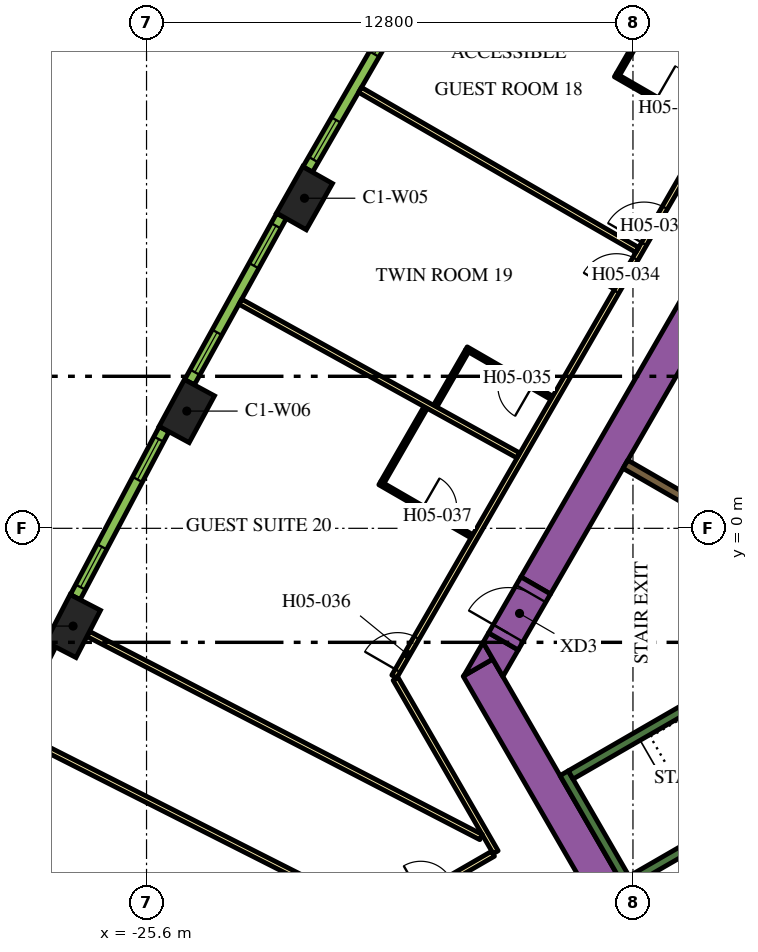
"""IFC4 building model, lengths in metres.
Left out: names, types, materials, properties, quantities, classifications, styles, units other than length and angle.
Written with IfcOpenShell. Run it as: python <this file> out.ifc"""

import sys

from ifc_helpers import new_model, si_unit, direction, frame, frame_2d, origin, origin_2d, place, context, subcontext, project, spatial, polyline, rectangle, outline, extrude, element, fill, save


model = new_model("IFC4")
c1 = context("Model", 3, precision=1e-05, world=origin(), true_north=direction((0.0, 1.0)))
c2 = subcontext(c1, "Body", "Model", "MODEL_VIEW")
j1 = project(units=[si_unit("LENGTHUNIT", "METRE"), si_unit("PLANEANGLEUNIT", "RADIAN")], contexts=[c1])
p1 = place(None, origin())
s1 = spatial("IfcSite", under=j1, at=p1, CompositionType="ELEMENT")
p2 = place(p1, origin())
s2 = spatial("IfcBuilding", under=s1, at=p2, CompositionType="ELEMENT")
p3 = place(p2, frame((0.0, 0.0, 74.4)))
s3 = spatial("IfcBuildingStorey", under=s2, at=p3, CompositionType="ELEMENT", Elevation=74.4)
for number, where, z_axis, x_axis in (
    (1, (-21.443, 8.685, 0.0), (0.0, 0.0, 1.0), (-0.492, -0.871, 0.0)),
    (2, (-24.54, 3.085, 0.0), (0.0, 0.0, 1.0), (-0.476, -0.88, 0.0)),
    (3, (-27.533, -2.572, 0.0), (0.0, 0.0, 1.0), (-0.459, -0.888, 0.0)),
):
    element("IfcColumn", number, at=place(p3, frame(where, z_axis=z_axis, x_axis=x_axis)), inside=s3, PredefinedType="COLUMN", context=c2, shape_type="SweptSolid", body=[
        extrude(rectangle(XDim=1.4, YDim=0.9, at=origin_2d()), origin(), (0.0, 0.0, 1.0), 3.9),
    ])
p4 = place(p3, frame((-15.36, -1.503, 0.0), z_axis=(0.0, 0.0, 1.0), x_axis=(0.50000389221, 0.866023156604, 0.0)))
e4 = element("IfcWall", 4, at=p4, inside=s3, PredefinedType="SOLIDWALL", context=c2, shape_type="SweptSolid", body=[
    extrude(rectangle(XDim=21.0, YDim=0.9, at=frame_2d((10.5, 0.0))), origin(), (0.0, 0.0, 1.0), 3.9),
])
p5 = place(p3, frame((-12.134, -11.883, 0.0), z_axis=(0.0, 0.0, 1.0), x_axis=(-0.500005339912, 0.866022320763, 0.0)))
e5 = element("IfcWall", 5, at=p5, inside=s3, PredefinedType="SOLIDWALL", context=c2, shape_type="SweptSolid", body=[
    extrude(rectangle(XDim=9.488, YDim=0.9, at=frame_2d((4.744, 0.0))), origin(), (0.0, 0.0, 1.0), 3.9),
])
p6 = place(p3, origin())
e6 = element("IfcWall", 6, at=p6, inside=s3, PredefinedType="SOLIDWALL", context=c2, shape_type="SweptSolid", body=[
    extrude(outline(polyline([(-16.489, -3.44), (-17.251, -3.88), (-16.743, -3.0), (-16.489, -3.44)])), origin(), (0.0, 0.0, 1.0), 3.9),
])
e7 = element("IfcWall", 7, at=p6, inside=s3, PredefinedType="SOLIDWALL", context=c2, shape_type="SweptSolid", body=[
    extrude(outline(polyline([(-15.82, -3.201), (-16.223, -3.9), (-16.743, -3.0), (-16.599, -2.751), (-15.82, -3.201)])), origin(), (0.0, 0.0, 1.0), 3.9),
])
p7 = place(p3, frame((-12.885, -9.431, 0.0), z_axis=(0.0, 0.0, 1.0), x_axis=(-0.500020560727, 0.866013532718, 0.0)))
e8 = element("IfcWall", 8, at=p7, inside=s3, PredefinedType="SOLIDWALL", context=c2, shape_type="SweptSolid", body=[
    extrude(rectangle(XDim=3.45, YDim=0.25, at=frame_2d((1.725, 0.0))), origin(), (0.0, 0.0, 1.0), 3.9),
])
p8 = place(p3, frame((-14.44, -6.49, 0.0), z_axis=(0.0, 0.0, 1.0), x_axis=(0.866022966069, 0.500004222222, 0.0)))
e9 = element("IfcWall", 9, at=p8, inside=s3, PredefinedType="SOLIDWALL", context=c2, shape_type="SweptSolid", body=[
    extrude(rectangle(XDim=6.8, YDim=0.25, at=frame_2d((3.4, 0.0))), origin(), (0.0, 0.0, 1.0), 3.9),
])
p9 = place(p3, frame((-12.84, -9.261, 0.0), z_axis=(0.0, 0.0, 1.0), x_axis=(0.866016039709, 0.500016218704, 0.0)))
e10 = element("IfcWall", 10, at=p9, inside=s3, PredefinedType="SOLIDWALL", context=c2, shape_type="SweptSolid", body=[
    extrude(rectangle(XDim=7.05, YDim=0.25, at=frame_2d((3.525, 0.0))), origin(), (0.0, 0.0, 1.0), 3.9),
])
p10 = place(p3, frame((-8.106, -1.14, 0.0), z_axis=(0.0, 0.0, 1.0), x_axis=(-0.866000643155, 0.500042884217, 0.0)))
e11 = element("IfcWall", 11, at=p10, inside=s3, PredefinedType="SOLIDWALL", context=c2, shape_type="SweptSolid", body=[
    extrude(rectangle(XDim=5.65, YDim=0.25, at=frame_2d((2.825, 0.0))), origin(), (0.0, 0.0, 1.0), 3.9),
])
p11 = place(p3, frame((-16.209, -2.976, 0.0), z_axis=(0.0, 0.0, 1.0), x_axis=(0.499954529098, 0.86605165483, 0.0)))
e12 = element("IfcWall", 12, at=p11, inside=s3, PredefinedType="SOLIDWALL", context=c2, shape_type="SweptSolid", body=[
    extrude(rectangle(XDim=1.7, YDim=0.9, at=frame_2d((0.85, 0.0))), origin(), (0.0, 0.0, 1.0), 3.9),
])
p12 = place(p11, frame((0.25, 0.0, 0.0)))
e13 = element("IfcOpeningElement", 13, at=p12, cuts=e12, PredefinedType="OPENING", context=c2, shape_type="SweptSolid", body=[
    extrude(rectangle(XDim=1.2, YDim=2.1, at=frame_2d((0.6, 1.05))), frame((0.0, 0.46, 0.0), z_axis=(0.0, -1.0, 0.0), x_axis=(1.0, 0.0, 0.0)), (0.0, 0.0, 1.0), 0.92),
])
p13 = place(p3, frame((-19.081, -3.9, 0.0), z_axis=(0.0, 0.0, 1.0), x_axis=(0.499998313975, 0.866026377209, 0.0)))
e14 = element("IfcWall", 14, at=p13, inside=s3, PredefinedType="PARTITIONING", context=c2, shape_type="SweptSolid", body=[
    extrude(rectangle(XDim=25.766, YDim=0.15, at=frame_2d((12.883, 0.0))), origin(), (0.0, 0.0, 1.0), 2.7),
])
p14 = place(p13, frame((24.265, 0.0, 0.0)))
e15 = element("IfcOpeningElement", 15, at=p14, cuts=e14, PredefinedType="OPENING", context=c2, shape_type="SweptSolid", body=[
    extrude(rectangle(XDim=1.0, YDim=2.1, at=frame_2d((0.5, 1.05))), frame((0.0, 0.085, 0.0), z_axis=(0.0, -1.0, 0.0), x_axis=(1.0, 0.0, 0.0)), (0.0, 0.0, 1.0), 0.17),
])
p15 = place(p13, frame((13.146, 0.0, 0.0)))
e16 = element("IfcOpeningElement", 16, at=p15, cuts=e14, PredefinedType="OPENING", context=c2, shape_type="SweptSolid", body=[
    extrude(rectangle(XDim=1.1, YDim=2.1, at=frame_2d((0.55, 1.05))), frame((0.0, 0.085, 0.0), z_axis=(0.0, -1.0, 0.0), x_axis=(1.0, 0.0, 0.0)), (0.0, 0.0, 1.0), 0.17),
])
p16 = place(p13, frame((11.693, 0.0, 0.0)))
e17 = element("IfcOpeningElement", 17, at=p16, cuts=e14, PredefinedType="OPENING", context=c2, shape_type="SweptSolid", body=[
    extrude(rectangle(XDim=1.0, YDim=2.1, at=frame_2d((0.5, 1.05))), frame((0.0, 0.085, 0.0), z_axis=(0.0, -1.0, 0.0), x_axis=(1.0, 0.0, 0.0)), (0.0, 0.0, 1.0), 0.17),
])
p17 = place(p13, frame((0.18, 0.0, 0.0)))
e18 = element("IfcOpeningElement", 18, at=p17, cuts=e14, PredefinedType="OPENING", context=c2, shape_type="SweptSolid", body=[
    extrude(rectangle(XDim=1.0, YDim=2.1, at=frame_2d((0.5, 1.05))), frame((0.0, 0.085, 0.0), z_axis=(0.0, -1.0, 0.0), x_axis=(1.0, 0.0, 0.0)), (0.0, 0.0, 1.0), 0.17),
])
p18 = place(p3, frame((-16.412, -8.523, 0.0), z_axis=(0.0, 0.0, 1.0), x_axis=(-0.500001929737, 0.866024289647, 0.0)))
e19 = element("IfcWall", 19, at=p18, inside=s3, PredefinedType="PARTITIONING", context=c2, shape_type="SweptSolid", body=[
    extrude(rectangle(XDim=5.268, YDim=0.15, at=frame_2d((2.634, 0.0))), origin(), (0.0, 0.0, 1.0), 2.7),
])
p19 = place(p3, frame((-30.463, -16.635, 0.0), z_axis=(0.0, 0.0, 1.0), x_axis=(0.866022394896, 0.500005211512, 0.0)))
e20 = element("IfcWall", 20, at=p19, inside=s3, PredefinedType="PARTITIONING", context=c2, shape_type="SweptSolid", body=[
    extrude(rectangle(XDim=16.144, YDim=0.15, at=frame_2d((8.072, 0.0))), origin(), (0.0, 0.0, 1.0), 2.7),
])
p20 = place(p19, frame((13.948, 0.0, 0.0)))
e21 = element("IfcOpeningElement", 21, at=p20, cuts=e20, PredefinedType="OPENING", context=c2, shape_type="SweptSolid", body=[
    extrude(rectangle(XDim=0.9, YDim=2.1, at=frame_2d((0.45, 1.05))), frame((0.0, 0.085, 0.0), z_axis=(0.0, -1.0, 0.0), x_axis=(1.0, 0.0, 0.0)), (0.0, 0.0, 1.0), 0.17),
])
p21 = place(p19, frame((10.329, 0.0, 0.0)))
e22 = element("IfcOpeningElement", 22, at=p21, cuts=e20, PredefinedType="OPENING", context=c2, shape_type="SweptSolid", body=[
    extrude(rectangle(XDim=0.9, YDim=2.1, at=frame_2d((0.45, 1.05))), frame((0.0, 0.085, 0.0), z_axis=(0.0, -1.0, 0.0), x_axis=(1.0, 0.0, 0.0)), (0.0, 0.0, 1.0), 0.17),
])
p22 = place(p19, frame((7.275, 0.0, 0.0)))
e23 = element("IfcOpeningElement", 23, at=p22, cuts=e20, PredefinedType="OPENING", context=c2, shape_type="SweptSolid", body=[
    extrude(rectangle(XDim=1.0, YDim=2.1, at=frame_2d((0.5, 1.05))), frame((0.0, 0.085, 0.0), z_axis=(0.0, -1.0, 0.0), x_axis=(1.0, 0.0, 0.0)), (0.0, 0.0, 1.0), 0.17),
])
p23 = place(p3, frame((-30.018, -8.483, 0.0), z_axis=(0.0, 0.0, 1.0), x_axis=(0.896544505264, -0.44295366584, 0.0)))
e24 = element("IfcWall", 24, at=p23, inside=s3, PredefinedType="PARTITIONING", context=c2, shape_type="SweptSolid", body=[
    extrude(rectangle(XDim=8.079, YDim=0.15, at=frame_2d((4.04, 0.0))), origin(), (0.0, 0.0, 1.0), 2.7),
])
p24 = place(p3, frame((-29.12, -5.356, 0.0), z_axis=(0.0, 0.0, 1.0), x_axis=(0.892401965553, -0.451241323327, 0.0)))
e25 = element("IfcWall", 25, at=p24, inside=s3, PredefinedType="PARTITIONING", context=c2, shape_type="SweptSolid", body=[
    extrude(rectangle(XDim=10.729, YDim=0.15, at=frame_2d((5.364, 0.0))), origin(), (0.0, 0.0, 1.0), 2.7),
])
p25 = place(p3, frame((-27.134, -2.779, 0.0), z_axis=(0.0, 0.0, 1.0), x_axis=(0.8882049501, -0.459447457951, 0.0)))
e26 = element("IfcWall", 26, at=p25, inside=s3, PredefinedType="PARTITIONING", context=c2, shape_type="SweptSolid", body=[
    extrude(rectangle(XDim=11.638, YDim=0.15, at=frame_2d((5.819, 0.0))), origin(), (0.0, 0.0, 1.0), 2.7),
])
p26 = place(p3, frame((-23.132, 5.962, 0.0), z_axis=(0.0, 0.0, 1.0), x_axis=(0.875121716713, -0.483902863121, 0.0)))
e27 = element("IfcWall", 27, at=p26, inside=s3, PredefinedType="PARTITIONING", context=c2, shape_type="SweptSolid", body=[
    extrude(rectangle(XDim=8.355, YDim=0.15, at=frame_2d((4.178, 0.0))), origin(), (0.0, 0.0, 1.0), 2.7),
])
p27 = place(p3, frame((-19.982, 11.537, 0.0), z_axis=(0.0, 0.0, 1.0), x_axis=(0.866020994654, -0.500007636761, 0.0)))
e28 = element("IfcWall", 28, at=p27, inside=s3, PredefinedType="PARTITIONING", context=c2, shape_type="SweptSolid", body=[
    extrude(rectangle(XDim=8.423, YDim=0.15, at=frame_2d((4.211, 0.0))), origin(), (0.0, 0.0, 1.0), 2.7),
])
p28 = place(p3, frame((-13.265, 11.924, 0.0), z_axis=(0.0, 0.0, 1.0), x_axis=(0.866034573852, -0.49998411664, 0.0)))
e29 = element("IfcWall", 29, at=p28, inside=s3, PredefinedType="PARTITIONING", context=c2, shape_type="SweptSolid", body=[
    extrude(rectangle(XDim=2.8, YDim=0.1, at=frame_2d((1.4, 0.0))), origin(), (0.0, 0.0, 1.0), 2.7),
])
p29 = place(p28, frame((1.25, 0.0, 0.0)))
e30 = element("IfcOpeningElement", 30, at=p29, cuts=e29, PredefinedType="OPENING", context=c2, shape_type="SweptSolid", body=[
    extrude(rectangle(XDim=1.0, YDim=2.1, at=frame_2d((0.5, 1.05))), frame((0.0, 0.06, 0.0), z_axis=(0.0, -1.0, 0.0), x_axis=(1.0, 0.0, 0.0)), (0.0, 0.0, 1.0), 0.12),
])
p30 = place(p3, frame((-13.197, 11.942, 0.0), z_axis=(0.0, 0.0, 1.0), x_axis=(0.499944914708, 0.866057204957, 0.0)))
e31 = element("IfcWall", 31, at=p30, inside=s3, PredefinedType="PARTITIONING", context=c2, shape_type="SweptSolid", body=[
    extrude(rectangle(XDim=2.47, YDim=0.1, at=frame_2d((1.235, 0.0))), origin(), (0.0, 0.0, 1.0), 2.7),
])
p31 = place(p3, frame((-14.935, 3.432, 0.0), z_axis=(0.0, 0.0, 1.0), x_axis=(-0.865997922154, 0.500047596559, 0.0)))
e32 = element("IfcWall", 32, at=p31, inside=s3, PredefinedType="PARTITIONING", context=c2, shape_type="SweptSolid", body=[
    extrude(rectangle(XDim=2.6, YDim=0.1, at=frame_2d((1.3, 0.0))), origin(), (0.0, 0.0, 1.0), 2.7),
])
p32 = place(p31, frame((0.6, 0.0, 0.0)))
e33 = element("IfcOpeningElement", 33, at=p32, cuts=e32, PredefinedType="OPENING", context=c2, shape_type="SweptSolid", body=[
    extrude(rectangle(XDim=0.9, YDim=2.1, at=frame_2d((0.45, 1.05))), frame((0.0, 0.06, 0.0), z_axis=(0.0, -1.0, 0.0), x_axis=(1.0, 0.0, 0.0)), (0.0, 0.0, 1.0), 0.12),
])
p33 = place(p3, frame((-17.168, 4.664, 0.0), z_axis=(0.0, 0.0, 1.0), x_axis=(-0.500085185139, -0.865976216535, 0.0)))
e34 = element("IfcWall", 34, at=p33, inside=s3, PredefinedType="PARTITIONING", context=c2, shape_type="SweptSolid", body=[
    extrude(rectangle(XDim=1.67, YDim=0.1, at=frame_2d((0.835, 0.0))), origin(), (0.0, 0.0, 1.0), 2.7),
])
p34 = place(p3, frame((-19.463, 1.19, 0.0), z_axis=(0.0, 0.0, 1.0), x_axis=(0.866034573852, -0.49998411664, 0.0)))
e35 = element("IfcWall", 35, at=p34, inside=s3, PredefinedType="PARTITIONING", context=c2, shape_type="SweptSolid", body=[
    extrude(rectangle(XDim=2.8, YDim=0.1, at=frame_2d((1.4, 0.0))), origin(), (0.0, 0.0, 1.0), 2.7),
])
p35 = place(p34, frame((1.3, 0.0, 0.0)))
e36 = element("IfcOpeningElement", 36, at=p35, cuts=e35, PredefinedType="OPENING", context=c2, shape_type="SweptSolid", body=[
    extrude(rectangle(XDim=0.9, YDim=2.1, at=frame_2d((0.45, 1.05))), frame((0.0, 0.06, 0.0), z_axis=(0.0, -1.0, 0.0), x_axis=(1.0, 0.0, 0.0)), (0.0, 0.0, 1.0), 0.12),
])
p36 = place(p3, frame((-19.389, 1.217, 0.0), z_axis=(0.0, 0.0, 1.0), x_axis=(0.49995000081, 0.866054268906, 0.0)))
e37 = element("IfcWall", 37, at=p36, inside=s3, PredefinedType="PARTITIONING", context=c2, shape_type="SweptSolid", body=[
    extrude(rectangle(XDim=2.26, YDim=0.1, at=frame_2d((1.13, 0.0))), origin(), (0.0, 0.0, 1.0), 2.7),
])
p37 = place(p3, frame((-18.858, 13.773, 0.0), z_axis=(0.0, 0.0, 1.0), x_axis=(-0.50002123722, -0.866013142123, 0.0)))
e38 = element("IfcWall", 38, at=p37, inside=s3, PredefinedType="SOLIDWALL", context=c2, shape_type="SweptSolid", body=[
    extrude(rectangle(XDim=4.998, YDim=0.29, at=frame_2d((2.499, 0.0))), origin(), (0.0, 0.0, 1.0), 3.6),
])
p38 = place(p37, frame((0.297, 0.0, 0.9)))
e39 = element("IfcOpeningElement", 39, at=p38, cuts=e38, PredefinedType="OPENING", context=c2, shape_type="SweptSolid", body=[
    extrude(rectangle(XDim=1.2, YDim=2.15, at=frame_2d((0.6, 1.075))), frame((0.0, 0.155, 0.0), z_axis=(0.0, -1.0, 0.0), x_axis=(1.0, 0.0, 0.0)), (0.0, 0.0, 1.0), 0.31),
])
p39 = place(p37, frame((3.501, 0.0, 0.9)))
e40 = element("IfcOpeningElement", 40, at=p39, cuts=e38, PredefinedType="OPENING", context=c2, shape_type="SweptSolid", body=[
    extrude(rectangle(XDim=1.2, YDim=2.15, at=frame_2d((0.6, 1.075))), frame((0.0, 0.155, 0.0), z_axis=(0.0, -1.0, 0.0), x_axis=(1.0, 0.0, 0.0)), (0.0, 0.0, 1.0), 0.31),
])
p40 = place(p3, frame((-22.05, 8.22, 0.0), z_axis=(0.0, 0.0, 1.0), x_axis=(-0.483912572871, -0.875116347589, 0.0)))
e41 = element("IfcWall", 41, at=p40, inside=s3, PredefinedType="SOLIDWALL", context=c2, shape_type="SweptSolid", body=[
    extrude(rectangle(XDim=4.998, YDim=0.29, at=frame_2d((2.499, 0.0))), origin(), (0.0, 0.0, 1.0), 3.6),
])
p41 = place(p40, frame((0.297, 0.0, 0.9)))
e42 = element("IfcOpeningElement", 42, at=p41, cuts=e41, PredefinedType="OPENING", context=c2, shape_type="SweptSolid", body=[
    extrude(rectangle(XDim=1.2, YDim=2.15, at=frame_2d((0.6, 1.075))), frame((0.0, 0.155, 0.0), z_axis=(0.0, -1.0, 0.0), x_axis=(1.0, 0.0, 0.0)), (0.0, 0.0, 1.0), 0.31),
])
p42 = place(p40, frame((3.501, 0.0, 0.9)))
e43 = element("IfcOpeningElement", 43, at=p42, cuts=e41, PredefinedType="OPENING", context=c2, shape_type="SweptSolid", body=[
    extrude(rectangle(XDim=1.2, YDim=2.15, at=frame_2d((0.6, 1.075))), frame((0.0, 0.155, 0.0), z_axis=(0.0, -1.0, 0.0), x_axis=(1.0, 0.0, 0.0)), (0.0, 0.0, 1.0), 0.31),
])
p43 = place(p3, frame((-25.138, 2.608, 0.0), z_axis=(0.0, 0.0, 1.0), x_axis=(-0.467629620899, -0.883924509026, 0.0)))
e44 = element("IfcWall", 44, at=p43, inside=s3, PredefinedType="SOLIDWALL", context=c2, shape_type="SweptSolid", body=[
    extrude(rectangle(XDim=4.998, YDim=0.29, at=frame_2d((2.499, 0.0))), origin(), (0.0, 0.0, 1.0), 3.6),
])
p44 = place(p43, frame((0.297, 0.0, 0.9)))
e45 = element("IfcOpeningElement", 45, at=p44, cuts=e44, PredefinedType="OPENING", context=c2, shape_type="SweptSolid", body=[
    extrude(rectangle(XDim=1.2, YDim=2.15, at=frame_2d((0.6, 1.075))), frame((0.0, 0.155, 0.0), z_axis=(0.0, -1.0, 0.0), x_axis=(1.0, 0.0, 0.0)), (0.0, 0.0, 1.0), 0.31),
])
p45 = place(p43, frame((3.501, 0.0, 0.9)))
e46 = element("IfcOpeningElement", 46, at=p45, cuts=e44, PredefinedType="OPENING", context=c2, shape_type="SweptSolid", body=[
    extrude(rectangle(XDim=1.2, YDim=2.15, at=frame_2d((0.6, 1.075))), frame((0.0, 0.155, 0.0), z_axis=(0.0, -1.0, 0.0), x_axis=(1.0, 0.0, 0.0)), (0.0, 0.0, 1.0), 0.31),
])
p46 = place(p3, frame((-28.122, -3.06, 0.0), z_axis=(0.0, 0.0, 1.0), x_axis=(-0.451233929645, -0.892405704115, 0.0)))
e47 = element("IfcWall", 47, at=p46, inside=s3, PredefinedType="SOLIDWALL", context=c2, shape_type="SweptSolid", body=[
    extrude(rectangle(XDim=4.998, YDim=0.29, at=frame_2d((2.499, 0.0))), origin(), (0.0, 0.0, 1.0), 3.6),
])
p47 = place(p46, frame((0.297, 0.0, 0.9)))
e48 = element("IfcOpeningElement", 48, at=p47, cuts=e47, PredefinedType="OPENING", context=c2, shape_type="SweptSolid", body=[
    extrude(rectangle(XDim=1.2, YDim=2.15, at=frame_2d((0.6, 1.075))), frame((0.0, 0.155, 0.0), z_axis=(0.0, -1.0, 0.0), x_axis=(1.0, 0.0, 0.0)), (0.0, 0.0, 1.0), 0.31),
])
p48 = place(p46, frame((3.501, 0.0, 0.9)))
e49 = element("IfcOpeningElement", 49, at=p48, cuts=e47, PredefinedType="OPENING", context=c2, shape_type="SweptSolid", body=[
    extrude(rectangle(XDim=1.2, YDim=2.15, at=frame_2d((0.6, 1.075))), frame((0.0, 0.155, 0.0), z_axis=(0.0, -1.0, 0.0), x_axis=(1.0, 0.0, 0.0)), (0.0, 0.0, 1.0), 0.31),
])
p49 = place(p12, origin())
e50 = element("IfcDoor", 50, at=p49, inside=s3, OperationType="SINGLE_SWING_LEFT", PredefinedType="DOOR", context=c2, shape_type="SweptSolid", body=[
    extrude(rectangle(XDim=1.2, YDim=2.1, at=frame_2d((0.6, 1.05))), frame((0.0, 0.025, 0.0), z_axis=(0.0, -1.0, 0.0), x_axis=(1.0, 0.0, 0.0)), (0.0, 0.0, 1.0), 0.05),
])
fill(e13, e50)
p50 = place(p15, origin())
e51 = element("IfcDoor", 51, at=p50, inside=s3, OperationType="SINGLE_SWING_LEFT", PredefinedType="DOOR", context=c2, shape_type="SweptSolid", body=[
    extrude(rectangle(XDim=1.1, YDim=2.1, at=frame_2d((0.55, 1.05))), frame((0.0, 0.025, 0.0), z_axis=(0.0, -1.0, 0.0), x_axis=(1.0, 0.0, 0.0)), (0.0, 0.0, 1.0), 0.05),
])
fill(e16, e51)
p51 = place(p29, origin())
e52 = element("IfcDoor", 52, at=p51, inside=s3, OperationType="SINGLE_SWING_RIGHT", PredefinedType="DOOR", context=c2, shape_type="SweptSolid", body=[
    extrude(rectangle(XDim=1.0, YDim=2.1, at=frame_2d((0.5, 1.05))), frame((0.0, 0.025, 0.0), z_axis=(0.0, -1.0, 0.0), x_axis=(1.0, 0.0, 0.0)), (0.0, 0.0, 1.0), 0.05),
])
fill(e30, e52)
p52 = place(p16, origin())
e53 = element("IfcDoor", 53, at=p52, inside=s3, OperationType="SINGLE_SWING_RIGHT", PredefinedType="DOOR", context=c2, shape_type="SweptSolid", body=[
    extrude(rectangle(XDim=1.0, YDim=2.1, at=frame_2d((0.5, 1.05))), frame((0.0, 0.025, 0.0), z_axis=(0.0, -1.0, 0.0), x_axis=(1.0, 0.0, 0.0)), (0.0, 0.0, 1.0), 0.05),
])
fill(e17, e53)
p53 = place(p32, origin())
e54 = element("IfcDoor", 54, at=p53, inside=s3, OperationType="SINGLE_SWING_LEFT", PredefinedType="DOOR", context=c2, shape_type="SweptSolid", body=[
    extrude(rectangle(XDim=0.9, YDim=2.1, at=frame_2d((0.45, 1.05))), frame((0.0, 0.025, 0.0), z_axis=(0.0, -1.0, 0.0), x_axis=(1.0, 0.0, 0.0)), (0.0, 0.0, 1.0), 0.05),
])
fill(e33, e54)
p54 = place(p17, origin())
e55 = element("IfcDoor", 55, at=p54, inside=s3, OperationType="SINGLE_SWING_LEFT", PredefinedType="DOOR", context=c2, shape_type="SweptSolid", body=[
    extrude(rectangle(XDim=1.0, YDim=2.1, at=frame_2d((0.5, 1.05))), frame((0.0, 0.025, 0.0), z_axis=(0.0, -1.0, 0.0), x_axis=(1.0, 0.0, 0.0)), (0.0, 0.0, 1.0), 0.05),
])
fill(e18, e55)
p55 = place(p35, origin())
e56 = element("IfcDoor", 56, at=p55, inside=s3, OperationType="SINGLE_SWING_LEFT", PredefinedType="DOOR", context=c2, shape_type="SweptSolid", body=[
    extrude(rectangle(XDim=0.9, YDim=2.1, at=frame_2d((0.45, 1.05))), frame((0.0, 0.025, 0.0), z_axis=(0.0, -1.0, 0.0), x_axis=(1.0, 0.0, 0.0)), (0.0, 0.0, 1.0), 0.05),
])
fill(e36, e56)
p56 = place(p38, origin())
e57 = element("IfcWindow", 57, at=p56, inside=s3, PartitioningType="DOUBLE_PANEL_VERTICAL", PredefinedType="WINDOW", context=c2, shape_type="SweptSolid", body=[
    extrude(rectangle(XDim=1.2, YDim=2.15, at=frame_2d((0.6, 1.075))), frame((0.0, 0.015, 0.0), z_axis=(0.0, -1.0, 0.0), x_axis=(1.0, 0.0, 0.0)), (0.0, 0.0, 1.0), 0.06),
])
fill(e39, e57)
p57 = place(p39, origin())
e58 = element("IfcWindow", 58, at=p57, inside=s3, PartitioningType="DOUBLE_PANEL_VERTICAL", PredefinedType="WINDOW", context=c2, shape_type="SweptSolid", body=[
    extrude(rectangle(XDim=1.2, YDim=2.15, at=frame_2d((0.6, 1.075))), frame((0.0, 0.015, 0.0), z_axis=(0.0, -1.0, 0.0), x_axis=(1.0, 0.0, 0.0)), (0.0, 0.0, 1.0), 0.06),
])
fill(e40, e58)
p58 = place(p41, origin())
e59 = element("IfcWindow", 59, at=p58, inside=s3, PartitioningType="DOUBLE_PANEL_VERTICAL", PredefinedType="WINDOW", context=c2, shape_type="SweptSolid", body=[
    extrude(rectangle(XDim=1.2, YDim=2.15, at=frame_2d((0.6, 1.075))), frame((0.0, 0.015, 0.0), z_axis=(0.0, -1.0, 0.0), x_axis=(1.0, 0.0, 0.0)), (0.0, 0.0, 1.0), 0.06),
])
fill(e42, e59)
p59 = place(p42, origin())
e60 = element("IfcWindow", 60, at=p59, inside=s3, PartitioningType="DOUBLE_PANEL_VERTICAL", PredefinedType="WINDOW", context=c2, shape_type="SweptSolid", body=[
    extrude(rectangle(XDim=1.2, YDim=2.15, at=frame_2d((0.6, 1.075))), frame((0.0, 0.015, 0.0), z_axis=(0.0, -1.0, 0.0), x_axis=(1.0, 0.0, 0.0)), (0.0, 0.0, 1.0), 0.06),
])
fill(e43, e60)
p60 = place(p44, origin())
e61 = element("IfcWindow", 61, at=p60, inside=s3, PartitioningType="DOUBLE_PANEL_VERTICAL", PredefinedType="WINDOW", context=c2, shape_type="SweptSolid", body=[
    extrude(rectangle(XDim=1.2, YDim=2.15, at=frame_2d((0.6, 1.075))), frame((0.0, 0.015, 0.0), z_axis=(0.0, -1.0, 0.0), x_axis=(1.0, 0.0, 0.0)), (0.0, 0.0, 1.0), 0.06),
])
fill(e45, e61)
p61 = place(p45, origin())
e62 = element("IfcWindow", 62, at=p61, inside=s3, PartitioningType="DOUBLE_PANEL_VERTICAL", PredefinedType="WINDOW", context=c2, shape_type="SweptSolid", body=[
    extrude(rectangle(XDim=1.2, YDim=2.15, at=frame_2d((0.6, 1.075))), frame((0.0, 0.015, 0.0), z_axis=(0.0, -1.0, 0.0), x_axis=(1.0, 0.0, 0.0)), (0.0, 0.0, 1.0), 0.06),
])
fill(e46, e62)
save(model, sys.argv[1])
